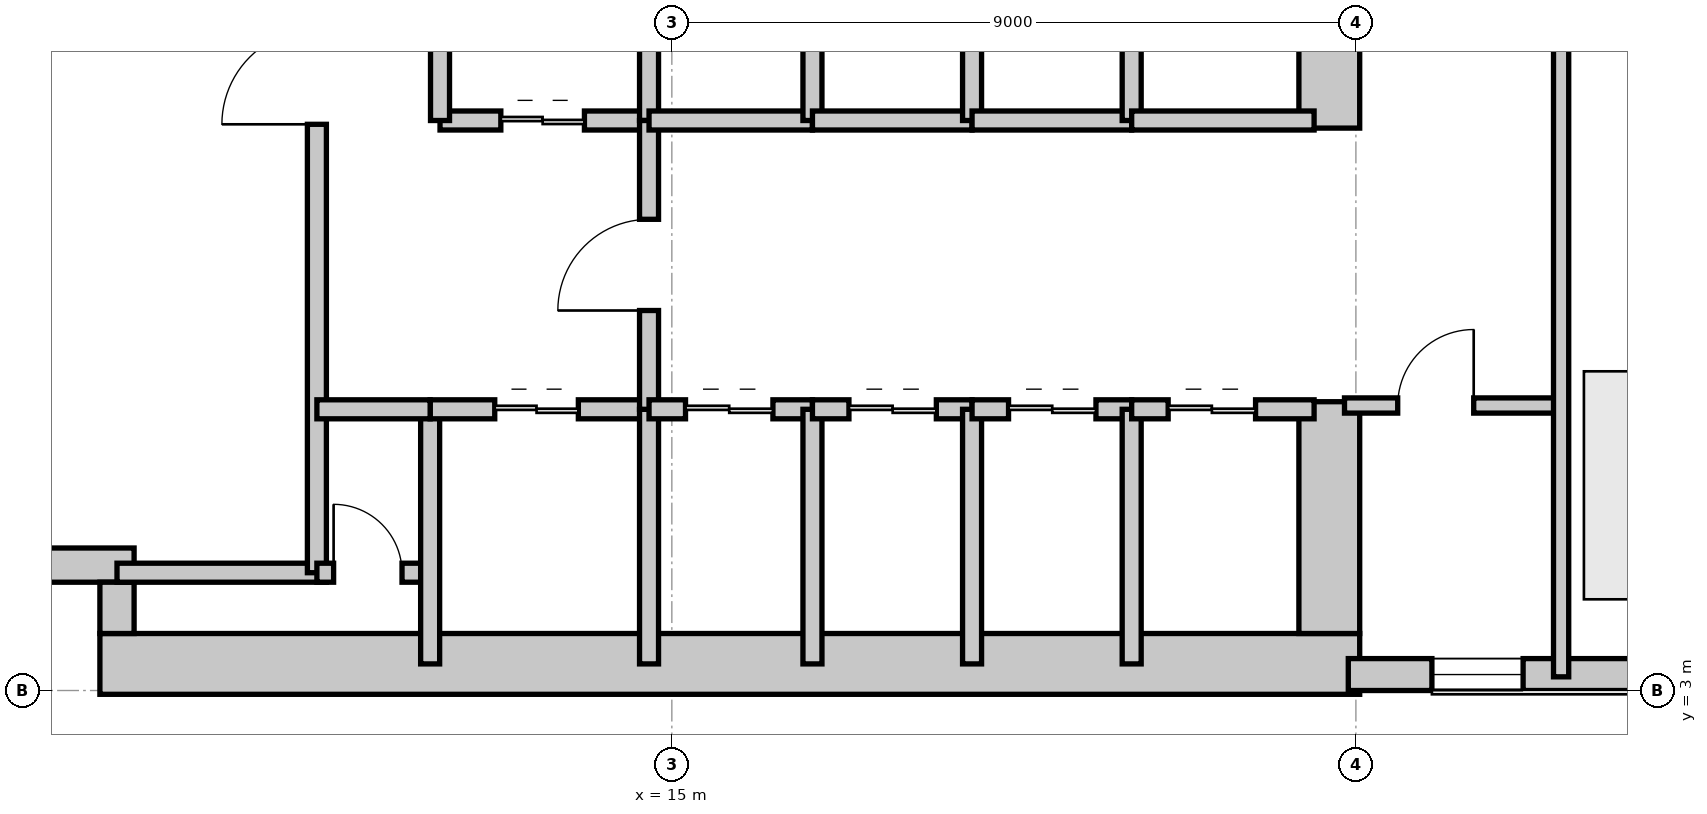
"""IFC4 building model, lengths in metres.
Left out: names, types, materials, properties, quantities, classifications, styles, units other than length and angle.
Written with IfcOpenShell. Run it as: python <this file> out.ifc"""

import sys

from ifc_helpers import new_model, si_unit, direction, frame, frame_2d, origin, origin_2d, place, context, subcontext, project, spatial, rectangle, extrude, element, fill, save


model = new_model("IFC4")
c1 = context("Model", 3, precision=1e-05, world=origin(), true_north=direction((0.0, 1.0)))
c2 = subcontext(c1, "Body", "Model", "MODEL_VIEW")
j1 = project(units=[si_unit("LENGTHUNIT", "METRE"), si_unit("PLANEANGLEUNIT", "RADIAN")], contexts=[c1])
p1 = place(None, origin())
s1 = spatial("IfcSite", under=j1, at=p1, CompositionType="ELEMENT")
p2 = place(p1, origin())
s2 = spatial("IfcBuilding", under=s1, at=p2, CompositionType="ELEMENT")
p3 = place(p2, frame((0.0, 0.0, 38.4)))
s3 = spatial("IfcBuildingStorey", under=s2, at=p3, CompositionType="ELEMENT", Elevation=38.4)
p4 = place(p3, frame((7.475, 3.35, 0.0), z_axis=(0.0, 0.0, 1.0), x_axis=(1.0, 0.0, 0.0)))
e1 = element("IfcWall", 1, at=p4, inside=s3, PredefinedType="SHEAR", context=c2, shape_type="SweptSolid", body=[
    extrude(rectangle(XDim=16.575, YDim=0.8, at=frame_2d((8.288, 0.0))), origin(), (0.0, 0.0, 1.0), 4.2),
])
p5 = place(p3, frame((23.65, 3.75, 0.0), z_axis=(0.0, 0.0, 1.0), x_axis=(0.0, 1.0, 0.0)))
e2 = element("IfcWall", 2, at=p5, inside=s3, PredefinedType="SHEAR", context=c2, shape_type="SweptSolid", body=[
    extrude(rectangle(XDim=3.05, YDim=0.8, at=frame_2d((1.525, 0.0))), origin(), (0.0, 0.0, 1.0), 4.2),
])
p6 = place(p3, frame((23.65, 10.4, 0.0), z_axis=(0.0, 0.0, 1.0), x_axis=(0.0, 1.0, 0.0)))
e3 = element("IfcWall", 3, at=p6, inside=s3, PredefinedType="SHEAR", context=c2, shape_type="SweptSolid", body=[
    extrude(rectangle(XDim=3.2, YDim=0.8, at=frame_2d((1.6, 0.0))), origin(), (0.0, 0.0, 1.0), 4.2),
])
p7 = place(p3, frame((6.75, 4.65, 0.0), z_axis=(0.0, 0.0, 1.0), x_axis=(1.0, 0.0, 0.0)))
e4 = element("IfcWall", 4, at=p7, inside=s3, PredefinedType="SHEAR", context=c2, shape_type="SweptSolid", body=[
    extrude(rectangle(XDim=1.175, YDim=0.45, at=frame_2d((0.587, 0.0))), origin(), (0.0, 0.0, 1.0), 4.2),
])
p8 = place(p3, frame((7.7, 3.75, 0.0), z_axis=(0.0, 0.0, 1.0), x_axis=(0.0, 1.0, 0.0)))
e5 = element("IfcWall", 5, at=p8, inside=s3, PredefinedType="SHEAR", context=c2, shape_type="SweptSolid", body=[
    extrude(rectangle(XDim=0.675, YDim=0.45, at=frame_2d((0.337, 0.0))), origin(), (0.0, 0.0, 1.0), 4.2),
])
p9 = place(p3, frame((24.0, 3.0, 0.0), z_axis=(0.0, 0.0, 1.0), x_axis=(1.0, 0.0, 0.0)))
e6 = element("IfcColumn", 6, at=p9, inside=s3, PredefinedType="COLUMN", context=c2, shape_type="SweptSolid", body=[
    extrude(rectangle(XDim=1.2, YDim=1.2, at=origin_2d()), origin(), (0.0, 0.0, 1.0), 4.2),
])
p10 = place(p3, frame((23.9, 3.21, 0.0), z_axis=(0.0, 0.0, 1.0), x_axis=(1.0, 0.0, 0.0)))
e7 = element("IfcWall", 7, at=p10, inside=s3, PredefinedType="STANDARD", context=c2, shape_type="SweptSolid", body=[
    extrude(rectangle(XDim=40.5, YDim=0.42, at=frame_2d((20.25, 0.0))), origin(), (0.0, 0.0, 1.0), 3.98),
])
p11 = place(p10, frame((1.1, 0.0, 0.85)))
e8 = element("IfcOpeningElement", 8, at=p11, cuts=e7, PredefinedType="OPENING", context=c2, shape_type="SweptSolid", body=[
    extrude(rectangle(XDim=1.2, YDim=2.45, at=frame_2d((0.6, 1.225))), frame((0.0, 0.22, 0.0), z_axis=(0.0, -1.0, 0.0), x_axis=(1.0, 0.0, 0.0)), (0.0, 0.0, 1.0), 0.44),
])
p12 = place(p10, frame((5.336, 0.0, 0.85)))
e9 = element("IfcOpeningElement", 9, at=p12, cuts=e7, PredefinedType="OPENING", context=c2, shape_type="SweptSolid", body=[
    extrude(rectangle(XDim=2.8, YDim=2.45, at=frame_2d((1.4, 1.225))), frame((0.0, 0.22, 0.0), z_axis=(0.0, -1.0, 0.0), x_axis=(1.0, 0.0, 0.0)), (0.0, 0.0, 1.0), 0.44),
])
p13 = place(p10, frame((14.336, 0.0, 0.85)))
e10 = element("IfcOpeningElement", 10, at=p13, cuts=e7, PredefinedType="OPENING", context=c2, shape_type="SweptSolid", body=[
    extrude(rectangle(XDim=2.8, YDim=2.45, at=frame_2d((1.4, 1.225))), frame((0.0, 0.22, 0.0), z_axis=(0.0, -1.0, 0.0), x_axis=(1.0, 0.0, 0.0)), (0.0, 0.0, 1.0), 0.44),
])
p14 = place(p10, frame((25.136, 0.0, 0.85)))
e11 = element("IfcOpeningElement", 11, at=p14, cuts=e7, PredefinedType="OPENING", context=c2, shape_type="SweptSolid", body=[
    extrude(rectangle(XDim=1.2, YDim=2.45, at=frame_2d((0.6, 1.225))), frame((0.0, 0.22, 0.0), z_axis=(0.0, -1.0, 0.0), x_axis=(1.0, 0.0, 0.0)), (0.0, 0.0, 1.0), 0.44),
])
p15 = place(p10, frame((34.086, 0.0, 0.85)))
e12 = element("IfcOpeningElement", 12, at=p15, cuts=e7, PredefinedType="OPENING", context=c2, shape_type="SweptSolid", body=[
    extrude(rectangle(XDim=1.2, YDim=2.45, at=frame_2d((0.6, 1.225))), frame((0.0, 0.22, 0.0), z_axis=(0.0, -1.0, 0.0), x_axis=(1.0, 0.0, 0.0)), (0.0, 0.0, 1.0), 0.44),
])
p16 = place(p3, frame((7.7, 4.55, 0.0), z_axis=(0.0, 0.0, 1.0), x_axis=(1.0, 0.0, 0.0)))
e13 = element("IfcWall", 13, at=p16, inside=s3, PredefinedType="SHEAR", context=c2, shape_type="SweptSolid", body=[
    extrude(rectangle(XDim=2.755, YDim=0.25, at=frame_2d((1.377, 0.0))), origin(), (0.0, 0.0, 1.0), 4.2),
])
p17 = place(p3, frame((10.33, 4.55, 0.0), z_axis=(0.0, 0.0, 1.0), x_axis=(0.0, 1.0, 0.0)))
e14 = element("IfcWall", 14, at=p17, inside=s3, PredefinedType="SHEAR", context=c2, shape_type="SweptSolid", body=[
    extrude(rectangle(XDim=7.45, YDim=0.25, at=frame_2d((3.725, 0.0))), origin(), (0.0, 0.0, 1.0), 4.2),
])
p18 = place(p17, frame((5.9, 0.0, 0.0)))
e15 = element("IfcOpeningElement", 15, at=p18, cuts=e14, PredefinedType="OPENING", context=c2, shape_type="SweptSolid", body=[
    extrude(rectangle(XDim=1.25, YDim=2.2, at=frame_2d((0.625, 1.1))), frame((0.0, 0.135, 0.0), z_axis=(0.0, -1.0, 0.0), x_axis=(1.0, 0.0, 0.0)), (0.0, 0.0, 1.0), 0.27),
])
p19 = place(p3, frame((10.33, 4.55, 0.0), z_axis=(0.0, 0.0, 1.0), x_axis=(1.0, 0.0, 0.0)))
e16 = element("IfcWall", 16, at=p19, inside=s3, PredefinedType="PARTITIONING", context=c2, shape_type="SweptSolid", body=[
    extrude(rectangle(XDim=1.49, YDim=0.25, at=frame_2d((0.745, 0.0))), origin(), (0.0, 0.0, 1.0), 3.97),
])
p20 = place(p19, frame((0.22, 0.0, 0.0)))
e17 = element("IfcOpeningElement", 17, at=p20, cuts=e16, PredefinedType="OPENING", context=c2, shape_type="SweptSolid", body=[
    extrude(rectangle(XDim=0.9, YDim=2.1, at=frame_2d((0.45, 1.05))), frame((0.0, 0.135, 0.0), z_axis=(0.0, -1.0, 0.0), x_axis=(1.0, 0.0, 0.0)), (0.0, 0.0, 1.0), 0.27),
])
p21 = place(p3, frame((11.82, 3.35, 0.0), z_axis=(0.0, 0.0, 1.0), x_axis=(0.0, 1.0, 0.0)))
e18 = element("IfcWall", 18, at=p21, inside=s3, PredefinedType="PARTITIONING", context=c2, shape_type="SweptSolid", body=[
    extrude(rectangle(XDim=3.35, YDim=0.25, at=frame_2d((1.675, 0.0))), origin(), (0.0, 0.0, 1.0), 3.97),
])
p22 = place(p3, frame((11.82, 6.7, 0.0), z_axis=(0.0, 0.0, 1.0), x_axis=(1.0, 0.0, 0.0)))
e19 = element("IfcWall", 19, at=p22, inside=s3, PredefinedType="PARTITIONING", context=c2, shape_type="SweptSolid", body=[
    extrude(rectangle(XDim=2.88, YDim=0.25, at=frame_2d((1.44, 0.0))), origin(), (0.0, 0.0, 1.0), 3.426),
])
p23 = place(p22, frame((0.85, 0.0, 0.0)))
e20 = element("IfcOpeningElement", 20, at=p23, cuts=e19, PredefinedType="OPENING", context=c2, shape_type="SweptSolid", body=[
    extrude(rectangle(XDim=1.1, YDim=2.25, at=frame_2d((0.55, 1.125))), frame((0.0, 0.135, 0.0), z_axis=(0.0, -1.0, 0.0), x_axis=(1.0, 0.0, 0.0)), (0.0, 0.0, 1.0), 0.27),
])
p24 = place(p3, frame((14.7, 3.35, 0.0), z_axis=(0.0, 0.0, 1.0), x_axis=(0.0, 1.0, 0.0)))
e21 = element("IfcWall", 21, at=p24, inside=s3, PredefinedType="PARTITIONING", context=c2, shape_type="SweptSolid", body=[
    extrude(rectangle(XDim=3.35, YDim=0.25, at=frame_2d((1.675, 0.0))), origin(), (0.0, 0.0, 1.0), 3.97),
])
p25 = place(p3, frame((11.95, 10.5, 0.0), z_axis=(0.0, 0.0, 1.0), x_axis=(1.0, 0.0, 0.0)))
e22 = element("IfcWall", 22, at=p25, inside=s3, PredefinedType="PARTITIONING", context=c2, shape_type="SweptSolid", body=[
    extrude(rectangle(XDim=2.75, YDim=0.25, at=frame_2d((1.375, 0.0))), origin(), (0.0, 0.0, 1.0), 3.426),
])
p26 = place(p25, frame((0.8, 0.0, 0.0)))
e23 = element("IfcOpeningElement", 23, at=p26, cuts=e22, PredefinedType="OPENING", context=c2, shape_type="SweptSolid", body=[
    extrude(rectangle(XDim=1.1, YDim=2.25, at=frame_2d((0.55, 1.125))), frame((0.0, 0.135, 0.0), z_axis=(0.0, -1.0, 0.0), x_axis=(1.0, 0.0, 0.0)), (0.0, 0.0, 1.0), 0.27),
])
for number, where, z_axis, x_axis in (
    (24, (11.95, 10.5, 0.0), (0.0, 0.0, 1.0), (0.0, 1.0, 0.0)),
    (25, (14.7, 10.5, 0.0), (0.0, 0.0, 1.0), (0.0, 1.0, 0.0)),
):
    element("IfcWall", number, at=place(p3, frame(where, z_axis=z_axis, x_axis=x_axis)), inside=s3, PredefinedType="PARTITIONING", context=c2, shape_type="SweptSolid", body=[
        extrude(rectangle(XDim=3.0, YDim=0.25, at=frame_2d((1.5, 0.0))), origin(), (0.0, 0.0, 1.0), 3.97),
    ])
p27 = place(p3, frame((14.7, 6.7, 0.0), z_axis=(0.0, 0.0, 1.0), x_axis=(0.0, 1.0, 0.0)))
e26 = element("IfcWall", 26, at=p27, inside=s3, PredefinedType="PARTITIONING", context=c2, shape_type="SweptSolid", body=[
    extrude(rectangle(XDim=3.8, YDim=0.25, at=frame_2d((1.9, 0.0))), origin(), (0.0, 0.0, 1.0), 3.97),
])
p28 = place(p27, frame((1.3, 0.0, 0.0)))
e27 = element("IfcOpeningElement", 27, at=p28, cuts=e26, PredefinedType="OPENING", context=c2, shape_type="SweptSolid", body=[
    extrude(rectangle(XDim=1.2, YDim=2.2, at=frame_2d((0.6, 1.1))), frame((0.0, 0.135, 0.0), z_axis=(0.0, -1.0, 0.0), x_axis=(1.0, 0.0, 0.0)), (0.0, 0.0, 1.0), 0.27),
])
p29 = place(p3, frame((10.33, 6.7, 0.0), z_axis=(0.0, 0.0, 1.0), x_axis=(1.0, 0.0, 0.0)))
e28 = element("IfcWall", 28, at=p29, inside=s3, PredefinedType="PARTITIONING", context=c2, shape_type="SweptSolid", body=[
    extrude(rectangle(XDim=1.49, YDim=0.25, at=frame_2d((0.745, 0.0))), origin(), (0.0, 0.0, 1.0), 3.426),
])
p30 = place(p3, frame((14.7, 6.7, 0.0), z_axis=(0.0, 0.0, 1.0), x_axis=(1.0, 0.0, 0.0)))
e29 = element("IfcWall", 29, at=p30, inside=s3, PredefinedType="PARTITIONING", context=c2, shape_type="SweptSolid", body=[
    extrude(rectangle(XDim=2.15, YDim=0.25, at=frame_2d((1.075, 0.0))), origin(), (0.0, 0.0, 1.0), 3.426),
])
p31 = place(p30, frame((0.48, 0.0, 0.0)))
e30 = element("IfcOpeningElement", 30, at=p31, cuts=e29, PredefinedType="OPENING", context=c2, shape_type="SweptSolid", body=[
    extrude(rectangle(XDim=1.15, YDim=2.25, at=frame_2d((0.575, 1.125))), frame((0.0, 0.135, 0.0), z_axis=(0.0, -1.0, 0.0), x_axis=(1.0, 0.0, 0.0)), (0.0, 0.0, 1.0), 0.27),
])
p32 = place(p3, frame((16.85, 3.35, 0.0), z_axis=(0.0, 0.0, 1.0), x_axis=(0.0, 1.0, 0.0)))
e31 = element("IfcWall", 31, at=p32, inside=s3, PredefinedType="PARTITIONING", context=c2, shape_type="SweptSolid", body=[
    extrude(rectangle(XDim=3.35, YDim=0.25, at=frame_2d((1.675, 0.0))), origin(), (0.0, 0.0, 1.0), 3.97),
])
p33 = place(p3, frame((16.85, 6.7, 0.0), z_axis=(0.0, 0.0, 1.0), x_axis=(1.0, 0.0, 0.0)))
e32 = element("IfcWall", 32, at=p33, inside=s3, PredefinedType="PARTITIONING", context=c2, shape_type="SweptSolid", body=[
    extrude(rectangle(XDim=2.1, YDim=0.25, at=frame_2d((1.05, 0.0))), origin(), (0.0, 0.0, 1.0), 3.426),
])
p34 = place(p33, frame((0.48, 0.0, 0.0)))
e33 = element("IfcOpeningElement", 33, at=p34, cuts=e32, PredefinedType="OPENING", context=c2, shape_type="SweptSolid", body=[
    extrude(rectangle(XDim=1.15, YDim=2.25, at=frame_2d((0.575, 1.125))), frame((0.0, 0.135, 0.0), z_axis=(0.0, -1.0, 0.0), x_axis=(1.0, 0.0, 0.0)), (0.0, 0.0, 1.0), 0.27),
])
p35 = place(p3, frame((18.95, 3.35, 0.0), z_axis=(0.0, 0.0, 1.0), x_axis=(0.0, 1.0, 0.0)))
e34 = element("IfcWall", 34, at=p35, inside=s3, PredefinedType="PARTITIONING", context=c2, shape_type="SweptSolid", body=[
    extrude(rectangle(XDim=3.35, YDim=0.25, at=frame_2d((1.675, 0.0))), origin(), (0.0, 0.0, 1.0), 3.97),
])
p36 = place(p3, frame((18.95, 6.7, 0.0), z_axis=(0.0, 0.0, 1.0), x_axis=(1.0, 0.0, 0.0)))
e35 = element("IfcWall", 35, at=p36, inside=s3, PredefinedType="PARTITIONING", context=c2, shape_type="SweptSolid", body=[
    extrude(rectangle(XDim=2.1, YDim=0.25, at=frame_2d((1.05, 0.0))), origin(), (0.0, 0.0, 1.0), 3.426),
])
p37 = place(p36, frame((0.48, 0.0, 0.0)))
e36 = element("IfcOpeningElement", 36, at=p37, cuts=e35, PredefinedType="OPENING", context=c2, shape_type="SweptSolid", body=[
    extrude(rectangle(XDim=1.15, YDim=2.25, at=frame_2d((0.575, 1.125))), frame((0.0, 0.135, 0.0), z_axis=(0.0, -1.0, 0.0), x_axis=(1.0, 0.0, 0.0)), (0.0, 0.0, 1.0), 0.27),
])
p38 = place(p3, frame((21.05, 3.35, 0.0), z_axis=(0.0, 0.0, 1.0), x_axis=(0.0, 1.0, 0.0)))
e37 = element("IfcWall", 37, at=p38, inside=s3, PredefinedType="PARTITIONING", context=c2, shape_type="SweptSolid", body=[
    extrude(rectangle(XDim=3.35, YDim=0.25, at=frame_2d((1.675, 0.0))), origin(), (0.0, 0.0, 1.0), 3.97),
])
p39 = place(p3, frame((21.05, 6.7, 0.0), z_axis=(0.0, 0.0, 1.0), x_axis=(1.0, 0.0, 0.0)))
e38 = element("IfcWall", 38, at=p39, inside=s3, PredefinedType="PARTITIONING", context=c2, shape_type="SweptSolid", body=[
    extrude(rectangle(XDim=2.4, YDim=0.25, at=frame_2d((1.2, 0.0))), origin(), (0.0, 0.0, 1.0), 3.426),
])
p40 = place(p39, frame((0.48, 0.0, 0.0)))
e39 = element("IfcOpeningElement", 39, at=p40, cuts=e38, PredefinedType="OPENING", context=c2, shape_type="SweptSolid", body=[
    extrude(rectangle(XDim=1.15, YDim=2.25, at=frame_2d((0.575, 1.125))), frame((0.0, 0.135, 0.0), z_axis=(0.0, -1.0, 0.0), x_axis=(1.0, 0.0, 0.0)), (0.0, 0.0, 1.0), 0.27),
])
p41 = place(p3, frame((14.7, 10.5, 0.0), z_axis=(0.0, 0.0, 1.0), x_axis=(1.0, 0.0, 0.0)))
e40 = element("IfcWall", 40, at=p41, inside=s3, PredefinedType="PARTITIONING", context=c2, shape_type="SweptSolid", body=[
    extrude(rectangle(XDim=2.15, YDim=0.25, at=frame_2d((1.075, 0.0))), origin(), (0.0, 0.0, 1.0), 3.426),
])
p42 = place(p3, frame((16.85, 10.5, 0.0), z_axis=(0.0, 0.0, 1.0), x_axis=(0.0, 1.0, 0.0)))
e41 = element("IfcWall", 41, at=p42, inside=s3, PredefinedType="PARTITIONING", context=c2, shape_type="SweptSolid", body=[
    extrude(rectangle(XDim=3.0, YDim=0.25, at=frame_2d((1.5, 0.0))), origin(), (0.0, 0.0, 1.0), 3.97),
])
p43 = place(p3, frame((16.85, 10.5, 0.0), z_axis=(0.0, 0.0, 1.0), x_axis=(1.0, 0.0, 0.0)))
e42 = element("IfcWall", 42, at=p43, inside=s3, PredefinedType="PARTITIONING", context=c2, shape_type="SweptSolid", body=[
    extrude(rectangle(XDim=2.1, YDim=0.25, at=frame_2d((1.05, 0.0))), origin(), (0.0, 0.0, 1.0), 3.426),
])
p44 = place(p3, frame((18.95, 10.5, 0.0), z_axis=(0.0, 0.0, 1.0), x_axis=(0.0, 1.0, 0.0)))
e43 = element("IfcWall", 43, at=p44, inside=s3, PredefinedType="PARTITIONING", context=c2, shape_type="SweptSolid", body=[
    extrude(rectangle(XDim=3.0, YDim=0.25, at=frame_2d((1.5, 0.0))), origin(), (0.0, 0.0, 1.0), 3.97),
])
p45 = place(p3, frame((18.95, 10.5, 0.0), z_axis=(0.0, 0.0, 1.0), x_axis=(1.0, 0.0, 0.0)))
e44 = element("IfcWall", 44, at=p45, inside=s3, PredefinedType="PARTITIONING", context=c2, shape_type="SweptSolid", body=[
    extrude(rectangle(XDim=2.1, YDim=0.25, at=frame_2d((1.05, 0.0))), origin(), (0.0, 0.0, 1.0), 3.426),
])
p46 = place(p3, frame((21.05, 10.5, 0.0), z_axis=(0.0, 0.0, 1.0), x_axis=(0.0, 1.0, 0.0)))
e45 = element("IfcWall", 45, at=p46, inside=s3, PredefinedType="PARTITIONING", context=c2, shape_type="SweptSolid", body=[
    extrude(rectangle(XDim=3.0, YDim=0.25, at=frame_2d((1.5, 0.0))), origin(), (0.0, 0.0, 1.0), 3.97),
])
p47 = place(p3, frame((21.05, 10.5, 0.0), z_axis=(0.0, 0.0, 1.0), x_axis=(1.0, 0.0, 0.0)))
e46 = element("IfcWall", 46, at=p47, inside=s3, PredefinedType="PARTITIONING", context=c2, shape_type="SweptSolid", body=[
    extrude(rectangle(XDim=2.4, YDim=0.25, at=frame_2d((1.2, 0.0))), origin(), (0.0, 0.0, 1.0), 3.426),
])
p48 = place(p3, frame((23.85, 6.75, 0.0), z_axis=(0.0, 0.0, 1.0), x_axis=(1.0, 0.0, 0.0)))
e47 = element("IfcWall", 47, at=p48, inside=s3, PredefinedType="PARTITIONING", context=c2, shape_type="SweptSolid", body=[
    extrude(rectangle(XDim=2.85, YDim=0.2, at=frame_2d((1.425, 0.0))), origin(), (0.0, 0.0, 1.0), 3.97),
])
p49 = place(p48, frame((0.7, 0.0, 0.0)))
e48 = element("IfcOpeningElement", 48, at=p49, cuts=e47, PredefinedType="OPENING", context=c2, shape_type="SweptSolid", body=[
    extrude(rectangle(XDim=1.0, YDim=2.15, at=frame_2d((0.5, 1.075))), frame((0.0, 0.11, 0.0), z_axis=(0.0, -1.0, 0.0), x_axis=(1.0, 0.0, 0.0)), (0.0, 0.0, 1.0), 0.22),
])
p50 = place(p3, frame((26.7, 3.18, 0.0), z_axis=(0.0, 0.0, 1.0), x_axis=(0.0, 1.0, 0.0)))
e49 = element("IfcWall", 49, at=p50, inside=s3, PredefinedType="PARTITIONING", context=c2, shape_type="SweptSolid", body=[
    extrude(rectangle(XDim=10.22, YDim=0.2, at=frame_2d((5.11, 0.0))), origin(), (0.0, 0.0, 1.0), 3.97),
])
p51 = place(p18, origin())
e50 = element("IfcDoor", 50, at=p51, inside=s3, OperationType="SINGLE_SWING_LEFT", PredefinedType="DOOR", context=c2, shape_type="SweptSolid", body=[
    extrude(rectangle(XDim=1.25, YDim=2.2, at=frame_2d((0.625, 1.1))), frame((0.0, 0.025, 0.0), z_axis=(0.0, -1.0, 0.0), x_axis=(1.0, 0.0, 0.0)), (0.0, 0.0, 1.0), 0.05),
])
fill(e15, e50)
p52 = place(p20, origin())
e51 = element("IfcDoor", 51, at=p52, inside=s3, OperationType="SINGLE_SWING_LEFT", PredefinedType="TRAPDOOR", context=c2, shape_type="SweptSolid", body=[
    extrude(rectangle(XDim=0.9, YDim=2.1, at=frame_2d((0.45, 1.05))), frame((0.0, 0.025, 0.0), z_axis=(0.0, -1.0, 0.0), x_axis=(1.0, 0.0, 0.0)), (0.0, 0.0, 1.0), 0.05),
])
fill(e17, e51)
p53 = place(p23, origin())
e52 = element("IfcDoor", 52, at=p53, inside=s3, OperationType="DOUBLE_DOOR_SLIDING", PredefinedType="DOOR", context=c2, shape_type="SweptSolid", body=[
    extrude(rectangle(XDim=1.1, YDim=2.25, at=frame_2d((0.55, 1.125))), frame((0.0, 0.025, 0.0), z_axis=(0.0, -1.0, 0.0), x_axis=(1.0, 0.0, 0.0)), (0.0, 0.0, 1.0), 0.05),
])
fill(e20, e52)
p54 = place(p26, origin())
e53 = element("IfcDoor", 53, at=p54, inside=s3, OperationType="DOUBLE_DOOR_SLIDING", PredefinedType="DOOR", context=c2, shape_type="SweptSolid", body=[
    extrude(rectangle(XDim=1.1, YDim=2.25, at=frame_2d((0.55, 1.125))), frame((0.0, 0.025, 0.0), z_axis=(0.0, -1.0, 0.0), x_axis=(1.0, 0.0, 0.0)), (0.0, 0.0, 1.0), 0.05),
])
fill(e23, e53)
p55 = place(p28, origin())
e54 = element("IfcDoor", 54, at=p55, inside=s3, OperationType="SINGLE_SWING_LEFT", PredefinedType="DOOR", context=c2, shape_type="SweptSolid", body=[
    extrude(rectangle(XDim=1.2, YDim=2.2, at=frame_2d((0.6, 1.1))), frame((0.0, 0.025, 0.0), z_axis=(0.0, -1.0, 0.0), x_axis=(1.0, 0.0, 0.0)), (0.0, 0.0, 1.0), 0.05),
])
fill(e27, e54)
p56 = place(p31, origin())
e55 = element("IfcDoor", 55, at=p56, inside=s3, OperationType="DOUBLE_DOOR_SLIDING", PredefinedType="DOOR", context=c2, shape_type="SweptSolid", body=[
    extrude(rectangle(XDim=1.15, YDim=2.25, at=frame_2d((0.575, 1.125))), frame((0.0, 0.025, 0.0), z_axis=(0.0, -1.0, 0.0), x_axis=(1.0, 0.0, 0.0)), (0.0, 0.0, 1.0), 0.05),
])
fill(e30, e55)
p57 = place(p34, origin())
e56 = element("IfcDoor", 56, at=p57, inside=s3, OperationType="DOUBLE_DOOR_SLIDING", PredefinedType="DOOR", context=c2, shape_type="SweptSolid", body=[
    extrude(rectangle(XDim=1.15, YDim=2.25, at=frame_2d((0.575, 1.125))), frame((0.0, 0.025, 0.0), z_axis=(0.0, -1.0, 0.0), x_axis=(1.0, 0.0, 0.0)), (0.0, 0.0, 1.0), 0.05),
])
fill(e33, e56)
p58 = place(p37, origin())
e57 = element("IfcDoor", 57, at=p58, inside=s3, OperationType="DOUBLE_DOOR_SLIDING", PredefinedType="DOOR", context=c2, shape_type="SweptSolid", body=[
    extrude(rectangle(XDim=1.15, YDim=2.25, at=frame_2d((0.575, 1.125))), frame((0.0, 0.025, 0.0), z_axis=(0.0, -1.0, 0.0), x_axis=(1.0, 0.0, 0.0)), (0.0, 0.0, 1.0), 0.05),
])
fill(e36, e57)
p59 = place(p40, origin())
e58 = element("IfcDoor", 58, at=p59, inside=s3, OperationType="DOUBLE_DOOR_SLIDING", PredefinedType="DOOR", context=c2, shape_type="SweptSolid", body=[
    extrude(rectangle(XDim=1.15, YDim=2.25, at=frame_2d((0.575, 1.125))), frame((0.0, 0.025, 0.0), z_axis=(0.0, -1.0, 0.0), x_axis=(1.0, 0.0, 0.0)), (0.0, 0.0, 1.0), 0.05),
])
fill(e39, e58)
p60 = place(p49, origin())
e59 = element("IfcDoor", 59, at=p60, inside=s3, OperationType="SINGLE_SWING_RIGHT", PredefinedType="DOOR", context=c2, shape_type="SweptSolid", body=[
    extrude(rectangle(XDim=1.0, YDim=2.15, at=frame_2d((0.5, 1.075))), frame((0.0, 0.025, 0.0), z_axis=(0.0, -1.0, 0.0), x_axis=(1.0, 0.0, 0.0)), (0.0, 0.0, 1.0), 0.05),
])
fill(e48, e59)
p61 = place(p11, origin())
e60 = element("IfcWindow", 60, at=p61, inside=s3, PartitioningType="SINGLE_PANEL", PredefinedType="WINDOW", context=c2, shape_type="SweptSolid", body=[
    extrude(rectangle(XDim=1.2, YDim=2.45, at=frame_2d((0.6, 1.225))), frame((0.0, 0.11, 0.0), z_axis=(0.0, -1.0, 0.0), x_axis=(1.0, 0.0, 0.0)), (0.0, 0.0, 1.0), 0.06),
])
fill(e8, e60)
save(model, sys.argv[1])
